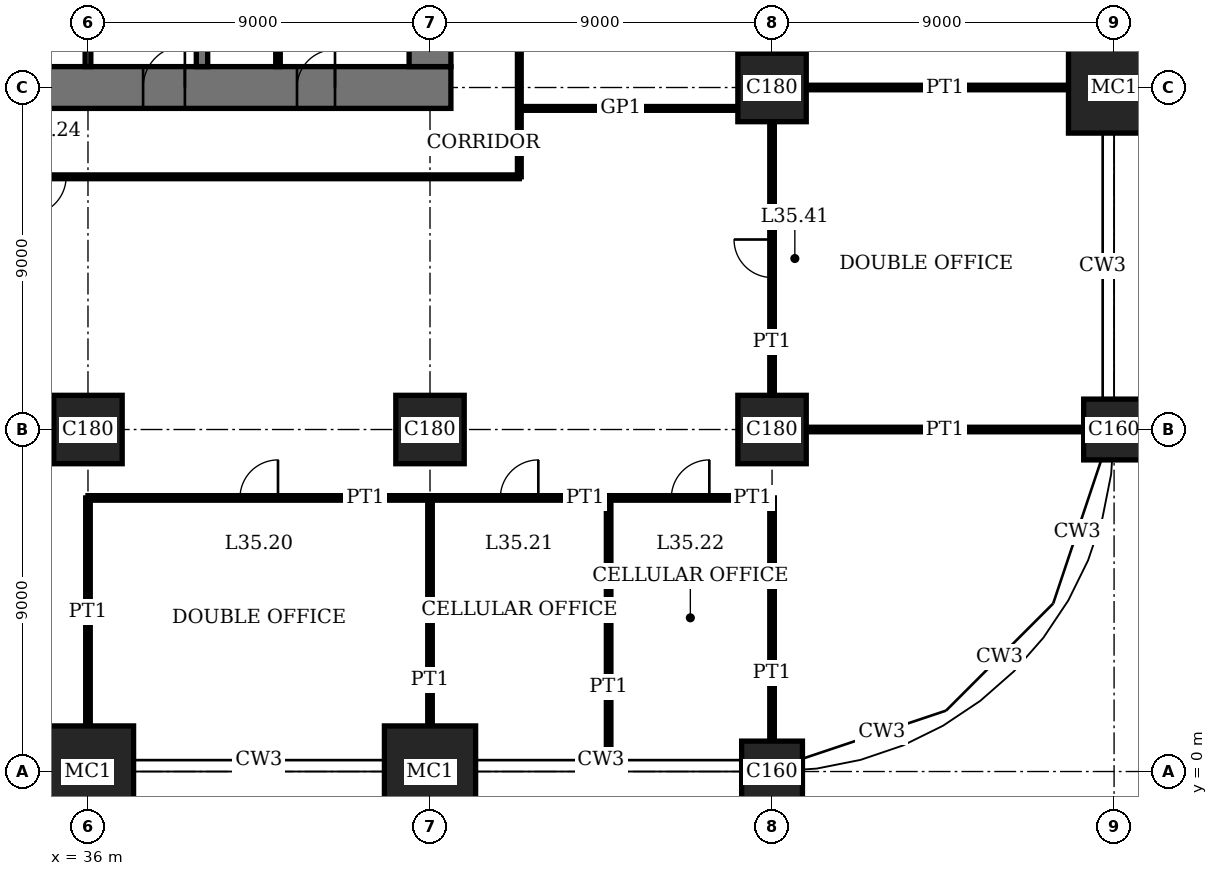
"""IFC4 building model, lengths in metres.
Left out: names, types, materials, properties, quantities, classifications, styles, units other than length and angle.
Written with IfcOpenShell. Run it as: python <this file> out.ifc"""

import sys

from ifc_helpers import new_model, si_unit, direction, frame, frame_2d, origin, origin_2d, place, context, subcontext, project, spatial, rectangle, extrude, element, fill, save


model = new_model("IFC4")
c1 = context("Model", 3, precision=1e-05, world=origin(), true_north=direction((0.0, 1.0)))
c2 = subcontext(c1, "Body", "Model", "MODEL_VIEW")
j1 = project(units=[si_unit("LENGTHUNIT", "METRE"), si_unit("PLANEANGLEUNIT", "RADIAN")], contexts=[c1])
p1 = place(None, origin())
s1 = spatial("IfcSite", under=j1, at=p1, CompositionType="ELEMENT")
p2 = place(p1, origin())
s2 = spatial("IfcBuilding", under=s1, at=p2, CompositionType="ELEMENT")
p3 = place(p2, frame((0.0, 0.0, 145.0)))
s3 = spatial("IfcBuildingStorey", under=s2, at=p3, CompositionType="ELEMENT", Elevation=145.0)
p4 = place(p3, frame((36.0, 0.0, 0.0), z_axis=(0.0, 0.0, 1.0), x_axis=(1.0, 0.0, 0.0)))
e1 = element("IfcColumn", 1, at=p4, inside=s3, PredefinedType="COLUMN", context=c2, shape_type="SweptSolid", body=[
    extrude(rectangle(XDim=2.4, YDim=2.4, at=origin_2d()), origin(), (0.0, 0.0, 1.0), 4.0),
])
p5 = place(p3, frame((36.0, 9.0, 0.0), z_axis=(0.0, 0.0, 1.0), x_axis=(1.0, 0.0, 0.0)))
e2 = element("IfcColumn", 2, at=p5, inside=s3, PredefinedType="COLUMN", context=c2, shape_type="SweptSolid", body=[
    extrude(rectangle(XDim=1.8, YDim=1.8, at=origin_2d()), origin(), (0.0, 0.0, 1.0), 4.0),
])
p6 = place(p3, frame((45.0, 0.0, 0.0), z_axis=(0.0, 0.0, 1.0), x_axis=(1.0, 0.0, 0.0)))
e3 = element("IfcColumn", 3, at=p6, inside=s3, PredefinedType="COLUMN", context=c2, shape_type="SweptSolid", body=[
    extrude(rectangle(XDim=2.4, YDim=2.4, at=origin_2d()), origin(), (0.0, 0.0, 1.0), 4.0),
])
p7 = place(p3, frame((45.0, 9.0, 0.0), z_axis=(0.0, 0.0, 1.0), x_axis=(1.0, 0.0, 0.0)))
e4 = element("IfcColumn", 4, at=p7, inside=s3, PredefinedType="COLUMN", context=c2, shape_type="SweptSolid", body=[
    extrude(rectangle(XDim=1.8, YDim=1.8, at=origin_2d()), origin(), (0.0, 0.0, 1.0), 4.0),
])
p8 = place(p3, frame((54.0, 0.0, 0.0), z_axis=(0.0, 0.0, 1.0), x_axis=(1.0, 0.0, 0.0)))
e5 = element("IfcColumn", 5, at=p8, inside=s3, PredefinedType="COLUMN", context=c2, shape_type="SweptSolid", body=[
    extrude(rectangle(XDim=1.6, YDim=1.6, at=origin_2d()), origin(), (0.0, 0.0, 1.0), 4.0),
])
for number, where, z_axis, x_axis in (
    (6, (54.0, 9.0, 0.0), (0.0, 0.0, 1.0), (1.0, 0.0, 0.0)),
    (7, (54.0, 18.0, 0.0), (0.0, 0.0, 1.0), (1.0, 0.0, 0.0)),
):
    element("IfcColumn", number, at=place(p3, frame(where, z_axis=z_axis, x_axis=x_axis)), inside=s3, PredefinedType="COLUMN", context=c2, shape_type="SweptSolid", body=[
        extrude(rectangle(XDim=1.8, YDim=1.8, at=origin_2d()), origin(), (0.0, 0.0, 1.0), 4.0),
    ])
p9 = place(p3, frame((63.0, 9.0, 0.0), z_axis=(0.0, 0.0, 1.0), x_axis=(1.0, 0.0, 0.0)))
e8 = element("IfcColumn", 8, at=p9, inside=s3, PredefinedType="COLUMN", context=c2, shape_type="SweptSolid", body=[
    extrude(rectangle(XDim=1.6, YDim=1.6, at=origin_2d()), origin(), (0.0, 0.0, 1.0), 4.0),
])
p10 = place(p3, frame((63.0, 18.0, 0.0), z_axis=(0.0, 0.0, 1.0), x_axis=(1.0, 0.0, 0.0)))
e9 = element("IfcColumn", 9, at=p10, inside=s3, PredefinedType="COLUMN", context=c2, shape_type="SweptSolid", body=[
    extrude(rectangle(XDim=2.4, YDim=2.4, at=origin_2d()), origin(), (0.0, 0.0, 1.0), 4.0),
])
p11 = place(p3, frame((17.45, 18.0, 0.0), z_axis=(0.0, 0.0, 1.0), x_axis=(1.0, 0.0, 0.0)))
e10 = element("IfcWall", 10, at=p11, inside=s3, PredefinedType="SHEAR", context=c2, shape_type="SweptSolid", body=[
    extrude(rectangle(XDim=28.1, YDim=1.1, at=frame_2d((14.05, 0.0))), origin(), (0.0, 0.0, 1.0), 4.0),
])
p12 = place(p11, frame((11.55, 0.0, 0.0)))
e11 = element("IfcOpeningElement", 11, at=p12, cuts=e10, PredefinedType="OPENING", context=c2, shape_type="SweptSolid", body=[
    extrude(rectangle(XDim=1.0, YDim=2.4, at=frame_2d((0.5, 1.2))), frame((0.0, 0.56, 0.0), z_axis=(0.0, -1.0, 0.0), x_axis=(1.0, 0.0, 0.0)), (0.0, 0.0, 1.0), 1.12),
])
p13 = place(p11, frame((16.55, 0.0, 0.0)))
e12 = element("IfcOpeningElement", 12, at=p13, cuts=e10, PredefinedType="OPENING", context=c2, shape_type="SweptSolid", body=[
    extrude(rectangle(XDim=1.0, YDim=2.4, at=frame_2d((0.5, 1.2))), frame((0.0, 0.56, 0.0), z_axis=(0.0, -1.0, 0.0), x_axis=(1.0, 0.0, 0.0)), (0.0, 0.0, 1.0), 1.12),
])
p14 = place(p11, frame((20.0, 0.0, 0.0)))
e13 = element("IfcOpeningElement", 13, at=p14, cuts=e10, PredefinedType="OPENING", context=c2, shape_type="SweptSolid", body=[
    extrude(rectangle(XDim=1.1, YDim=2.4, at=frame_2d((0.55, 1.2))), frame((0.0, 0.56, 0.0), z_axis=(0.0, -1.0, 0.0), x_axis=(1.0, 0.0, 0.0)), (0.0, 0.0, 1.0), 1.12),
])
p15 = place(p11, frame((24.05, 0.0, 0.0)))
e14 = element("IfcOpeningElement", 14, at=p15, cuts=e10, PredefinedType="OPENING", context=c2, shape_type="SweptSolid", body=[
    extrude(rectangle(XDim=1.0, YDim=2.4, at=frame_2d((0.5, 1.2))), frame((0.0, 0.56, 0.0), z_axis=(0.0, -1.0, 0.0), x_axis=(1.0, 0.0, 0.0)), (0.0, 0.0, 1.0), 1.12),
])
p16 = place(p3, frame((45.0, 18.55, 0.0), z_axis=(0.0, 0.0, 1.0), x_axis=(0.0, 1.0, 0.0)))
e15 = element("IfcWall", 15, at=p16, inside=s3, PredefinedType="SHEAR", context=c2, shape_type="SweptSolid", body=[
    extrude(rectangle(XDim=16.9, YDim=1.1, at=frame_2d((8.45, 0.0))), origin(), (0.0, 0.0, 1.0), 4.0),
])
p17 = place(p16, frame((8.45, 0.0, 0.0)))
e16 = element("IfcOpeningElement", 16, at=p17, cuts=e15, PredefinedType="OPENING", context=c2, shape_type="SweptSolid", body=[
    extrude(rectangle(XDim=1.8, YDim=2.4, at=frame_2d((0.9, 1.2))), frame((0.0, 0.56, 0.0), z_axis=(0.0, -1.0, 0.0), x_axis=(1.0, 0.0, 0.0)), (0.0, 0.0, 1.0), 1.12),
])
p18 = place(p3, frame((39.0, 18.55, 0.0), z_axis=(0.0, 0.0, 1.0), x_axis=(0.0, 1.0, 0.0)))
e17 = element("IfcWall", 17, at=p18, inside=s3, PredefinedType="SHEAR", context=c2, shape_type="SweptSolid", body=[
    extrude(rectangle(XDim=5.9, YDim=0.3, at=frame_2d((2.95, 0.0))), origin(), (0.0, 0.0, 1.0), 4.0),
])
p19 = place(p3, frame((36.0, 7.2, 0.0), z_axis=(0.0, 0.0, 1.0), x_axis=(1.0, 0.0, 0.0)))
e18 = element("IfcWall", 18, at=p19, inside=s3, PredefinedType="PARTITIONING", context=c2, shape_type="SweptSolid", body=[
    extrude(rectangle(XDim=9.0, YDim=0.12, at=frame_2d((4.5, 0.0))), origin(), (0.0, 0.0, 1.0), 3.75),
])
p20 = place(p19, frame((4.0, 0.0, 0.0)))
e19 = element("IfcOpeningElement", 19, at=p20, cuts=e18, PredefinedType="OPENING", context=c2, shape_type="SweptSolid", body=[
    extrude(rectangle(XDim=1.0, YDim=2.4, at=frame_2d((0.5, 1.2))), frame((0.0, 0.07, 0.0), z_axis=(0.0, -1.0, 0.0), x_axis=(1.0, 0.0, 0.0)), (0.0, 0.0, 1.0), 0.14),
])
p21 = place(p3, frame((45.0, 7.2, 0.0), z_axis=(0.0, 0.0, 1.0), x_axis=(1.0, 0.0, 0.0)))
e20 = element("IfcWall", 20, at=p21, inside=s3, PredefinedType="PARTITIONING", context=c2, shape_type="SweptSolid", body=[
    extrude(rectangle(XDim=4.7, YDim=0.12, at=frame_2d((2.35, 0.0))), origin(), (0.0, 0.0, 1.0), 3.75),
])
p22 = place(p21, frame((1.85, 0.0, 0.0)))
e21 = element("IfcOpeningElement", 21, at=p22, cuts=e20, PredefinedType="OPENING", context=c2, shape_type="SweptSolid", body=[
    extrude(rectangle(XDim=1.0, YDim=2.4, at=frame_2d((0.5, 1.2))), frame((0.0, 0.07, 0.0), z_axis=(0.0, -1.0, 0.0), x_axis=(1.0, 0.0, 0.0)), (0.0, 0.0, 1.0), 0.14),
])
p23 = place(p3, frame((49.7, 7.2, 0.0), z_axis=(0.0, 0.0, 1.0), x_axis=(1.0, 0.0, 0.0)))
e22 = element("IfcWall", 22, at=p23, inside=s3, PredefinedType="PARTITIONING", context=c2, shape_type="SweptSolid", body=[
    extrude(rectangle(XDim=4.3, YDim=0.12, at=frame_2d((2.15, 0.0))), origin(), (0.0, 0.0, 1.0), 3.75),
])
p24 = place(p23, frame((1.65, 0.0, 0.0)))
e23 = element("IfcOpeningElement", 23, at=p24, cuts=e22, PredefinedType="OPENING", context=c2, shape_type="SweptSolid", body=[
    extrude(rectangle(XDim=1.0, YDim=2.4, at=frame_2d((0.5, 1.2))), frame((0.0, 0.07, 0.0), z_axis=(0.0, -1.0, 0.0), x_axis=(1.0, 0.0, 0.0)), (0.0, 0.0, 1.0), 0.14),
])
p25 = place(p3, frame((54.9, 9.0, 0.0), z_axis=(0.0, 0.0, 1.0), x_axis=(1.0, 0.0, 0.0)))
e24 = element("IfcWall", 24, at=p25, inside=s3, PredefinedType="PARTITIONING", context=c2, shape_type="SweptSolid", body=[
    extrude(rectangle(XDim=7.3, YDim=0.12, at=frame_2d((3.65, 0.0))), origin(), (0.0, 0.0, 1.0), 3.05),
])
p26 = place(p3, frame((22.5, 15.65, 0.0), z_axis=(0.0, 0.0, 1.0), x_axis=(1.0, 0.0, 0.0)))
e25 = element("IfcWall", 25, at=p26, inside=s3, PredefinedType="PARTITIONING", context=c2, shape_type="SweptSolid", body=[
    extrude(rectangle(XDim=24.85, YDim=0.1, at=frame_2d((12.425, 0.0))), origin(), (0.0, 0.0, 1.0), 3.75),
])
p27 = place(p26, frame((11.925, 0.0, 0.0)))
e26 = element("IfcOpeningElement", 26, at=p27, cuts=e25, PredefinedType="OPENING", context=c2, shape_type="SweptSolid", body=[
    extrude(rectangle(XDim=1.0, YDim=2.4, at=frame_2d((0.5, 1.2))), frame((0.0, 0.06, 0.0), z_axis=(0.0, -1.0, 0.0), x_axis=(1.0, 0.0, 0.0)), (0.0, 0.0, 1.0), 0.12),
])
p28 = place(p3, frame((47.35, 17.45, 0.0), z_axis=(0.0, 0.0, 1.0), x_axis=(1.0, 0.0, 0.0)))
e27 = element("IfcWall", 27, at=p28, inside=s3, PredefinedType="PARTITIONING", context=c2, shape_type="SweptSolid", body=[
    extrude(rectangle(XDim=5.75, YDim=0.1, at=frame_2d((2.875, 0.0))), origin(), (0.0, 0.0, 1.0), 3.05),
])
p29 = place(p3, frame((54.9, 18.0, 0.0), z_axis=(0.0, 0.0, 1.0), x_axis=(1.0, 0.0, 0.0)))
e28 = element("IfcWall", 28, at=p29, inside=s3, PredefinedType="PARTITIONING", context=c2, shape_type="SweptSolid", body=[
    extrude(rectangle(XDim=6.9, YDim=0.12, at=frame_2d((3.45, 0.0))), origin(), (0.0, 0.0, 1.0), 3.05),
])
for number, where, z_axis, x_axis in (
    (29, (36.0, 1.2, 0.0), (0.0, 0.0, 1.0), (0.0, 1.0, 0.0)),
    (30, (45.0, 1.2, 0.0), (0.0, 0.0, 1.0), (0.0, 1.0, 0.0)),
):
    element("IfcWall", number, at=place(p3, frame(where, z_axis=z_axis, x_axis=x_axis)), inside=s3, PredefinedType="PARTITIONING", context=c2, shape_type="SweptSolid", body=[
        extrude(rectangle(XDim=6.0, YDim=0.12, at=frame_2d((3.0, 0.0))), origin(), (0.0, 0.0, 1.0), 3.05),
    ])
p30 = place(p3, frame((47.35, 15.65, 0.0), z_axis=(0.0, 0.0, 1.0), x_axis=(0.0, 1.0, 0.0)))
e31 = element("IfcWall", 31, at=p30, inside=s3, PredefinedType="PARTITIONING", context=c2, shape_type="SweptSolid", body=[
    extrude(rectangle(XDim=20.9, YDim=0.1, at=frame_2d((10.45, 0.0))), origin(), (0.0, 0.0, 1.0), 3.75),
])
p31 = place(p30, frame((9.95, 0.0, 0.0)))
e32 = element("IfcOpeningElement", 32, at=p31, cuts=e31, PredefinedType="OPENING", context=c2, shape_type="SweptSolid", body=[
    extrude(rectangle(XDim=1.0, YDim=2.4, at=frame_2d((0.5, 1.2))), frame((0.0, 0.06, 0.0), z_axis=(0.0, -1.0, 0.0), x_axis=(1.0, 0.0, 0.0)), (0.0, 0.0, 1.0), 0.12),
])
p32 = place(p3, frame((49.7, 0.31, 0.0), z_axis=(0.0, 0.0, 1.0), x_axis=(0.0, 1.0, 0.0)))
e33 = element("IfcWall", 33, at=p32, inside=s3, PredefinedType="PARTITIONING", context=c2, shape_type="SweptSolid", body=[
    extrude(rectangle(XDim=6.89, YDim=0.12, at=frame_2d((3.445, 0.0))), origin(), (0.0, 0.0, 1.0), 3.75),
])
p33 = place(p3, frame((54.0, 0.8, 0.0), z_axis=(0.0, 0.0, 1.0), x_axis=(0.0, 1.0, 0.0)))
e34 = element("IfcWall", 34, at=p33, inside=s3, PredefinedType="PARTITIONING", context=c2, shape_type="SweptSolid", body=[
    extrude(rectangle(XDim=6.4, YDim=0.12, at=frame_2d((3.2, 0.0))), origin(), (0.0, 0.0, 1.0), 3.05),
])
p34 = place(p3, frame((54.0, 9.9, 0.0), z_axis=(0.0, 0.0, 1.0), x_axis=(0.0, 1.0, 0.0)))
e35 = element("IfcWall", 35, at=p34, inside=s3, PredefinedType="PARTITIONING", context=c2, shape_type="SweptSolid", body=[
    extrude(rectangle(XDim=7.2, YDim=0.12, at=frame_2d((3.6, 0.0))), origin(), (0.0, 0.0, 1.0), 3.05),
])
p35 = place(p34, frame((3.1, 0.0, 0.0)))
e36 = element("IfcOpeningElement", 36, at=p35, cuts=e35, PredefinedType="OPENING", context=c2, shape_type="SweptSolid", body=[
    extrude(rectangle(XDim=1.0, YDim=2.4, at=frame_2d((0.5, 1.2))), frame((0.0, 0.07, 0.0), z_axis=(0.0, -1.0, 0.0), x_axis=(1.0, 0.0, 0.0)), (0.0, 0.0, 1.0), 0.14),
])
p36 = place(p3, frame((36.0, 18.55, 0.0), z_axis=(0.0, 0.0, 1.0), x_axis=(0.0, 1.0, 0.0)))
e37 = element("IfcWall", 37, at=p36, inside=s3, PredefinedType="PARTITIONING", context=c2, shape_type="SweptSolid", body=[
    extrude(rectangle(XDim=2.9, YDim=0.15, at=frame_2d((1.45, 0.0))), origin(), (0.0, 0.0, 1.0), 3.75),
])
p37 = place(p3, frame((41.0, 18.55, 0.0), z_axis=(0.0, 0.0, 1.0), x_axis=(0.0, 1.0, 0.0)))
e38 = element("IfcWall", 38, at=p37, inside=s3, PredefinedType="PARTITIONING", context=c2, shape_type="SweptSolid", body=[
    extrude(rectangle(XDim=2.9, YDim=0.12, at=frame_2d((1.45, 0.0))), origin(), (0.0, 0.0, 1.0), 3.75),
])
p38 = place(p37, frame((0.95, 0.0, 0.0)))
e39 = element("IfcOpeningElement", 39, at=p38, cuts=e38, PredefinedType="OPENING", context=c2, shape_type="SweptSolid", body=[
    extrude(rectangle(XDim=1.0, YDim=2.4, at=frame_2d((0.5, 1.2))), frame((0.0, 0.07, 0.0), z_axis=(0.0, -1.0, 0.0), x_axis=(1.0, 0.0, 0.0)), (0.0, 0.0, 1.0), 0.14),
])
p39 = place(p14, origin())
e40 = element("IfcDoor", 40, at=p39, inside=s3, OperationType="SINGLE_SWING_LEFT", PredefinedType="DOOR", context=c2, shape_type="SweptSolid", body=[
    extrude(rectangle(XDim=1.1, YDim=2.4, at=frame_2d((0.55, 1.2))), frame((0.0, 0.025, 0.0), z_axis=(0.0, -1.0, 0.0), x_axis=(1.0, 0.0, 0.0)), (0.0, 0.0, 1.0), 0.05),
    extrude(rectangle(XDim=0.04, YDim=2.4, at=frame_2d((0.02, 1.2))), frame((0.0, 0.44, 0.0), z_axis=(0.0, -1.0, 0.0), x_axis=(1.0, 0.0, 0.0)), (0.0, 0.0, 1.0), 0.88),
    extrude(rectangle(XDim=0.04, YDim=2.4, at=frame_2d((1.08, 1.2))), frame((0.0, 0.44, 0.0), z_axis=(0.0, -1.0, 0.0), x_axis=(1.0, 0.0, 0.0)), (0.0, 0.0, 1.0), 0.88),
    extrude(rectangle(XDim=1.1, YDim=0.04, at=frame_2d((0.55, 2.38))), frame((0.0, 0.44, 0.0), z_axis=(0.0, -1.0, 0.0), x_axis=(1.0, 0.0, 0.0)), (0.0, 0.0, 1.0), 0.88),
])
fill(e13, e40)
p40 = place(p15, origin())
e41 = element("IfcDoor", 41, at=p40, inside=s3, OperationType="SINGLE_SWING_LEFT", PredefinedType="DOOR", context=c2, shape_type="SweptSolid", body=[
    extrude(rectangle(XDim=1.0, YDim=2.4, at=frame_2d((0.5, 1.2))), frame((0.0, 0.025, 0.0), z_axis=(0.0, -1.0, 0.0), x_axis=(1.0, 0.0, 0.0)), (0.0, 0.0, 1.0), 0.05),
    extrude(rectangle(XDim=0.04, YDim=2.4, at=frame_2d((0.02, 1.2))), frame((0.0, 0.4, 0.0), z_axis=(0.0, -1.0, 0.0), x_axis=(1.0, 0.0, 0.0)), (0.0, 0.0, 1.0), 0.8),
    extrude(rectangle(XDim=0.04, YDim=2.4, at=frame_2d((0.98, 1.2))), frame((0.0, 0.4, 0.0), z_axis=(0.0, -1.0, 0.0), x_axis=(1.0, 0.0, 0.0)), (0.0, 0.0, 1.0), 0.8),
    extrude(rectangle(XDim=1.0, YDim=0.04, at=frame_2d((0.5, 2.38))), frame((0.0, 0.4, 0.0), z_axis=(0.0, -1.0, 0.0), x_axis=(1.0, 0.0, 0.0)), (0.0, 0.0, 1.0), 0.8),
])
fill(e14, e41)
p41 = place(p20, origin())
e42 = element("IfcDoor", 42, at=p41, inside=s3, OperationType="SINGLE_SWING_LEFT", PredefinedType="DOOR", context=c2, shape_type="SweptSolid", body=[
    extrude(rectangle(XDim=1.0, YDim=2.4, at=frame_2d((0.5, 1.2))), frame((0.0, 0.025, 0.0), z_axis=(0.0, -1.0, 0.0), x_axis=(1.0, 0.0, 0.0)), (0.0, 0.0, 1.0), 0.05),
])
fill(e19, e42)
p42 = place(p22, origin())
e43 = element("IfcDoor", 43, at=p42, inside=s3, OperationType="SINGLE_SWING_LEFT", PredefinedType="DOOR", context=c2, shape_type="SweptSolid", body=[
    extrude(rectangle(XDim=1.0, YDim=2.4, at=frame_2d((0.5, 1.2))), frame((0.0, 0.025, 0.0), z_axis=(0.0, -1.0, 0.0), x_axis=(1.0, 0.0, 0.0)), (0.0, 0.0, 1.0), 0.05),
])
fill(e21, e43)
p43 = place(p24, origin())
e44 = element("IfcDoor", 44, at=p43, inside=s3, OperationType="SINGLE_SWING_LEFT", PredefinedType="DOOR", context=c2, shape_type="SweptSolid", body=[
    extrude(rectangle(XDim=1.0, YDim=2.4, at=frame_2d((0.5, 1.2))), frame((0.0, 0.025, 0.0), z_axis=(0.0, -1.0, 0.0), x_axis=(1.0, 0.0, 0.0)), (0.0, 0.0, 1.0), 0.05),
])
fill(e23, e44)
p44 = place(p27, origin())
e45 = element("IfcDoor", 45, at=p44, inside=s3, OperationType="SINGLE_SWING_LEFT", PredefinedType="DOOR", context=c2, shape_type="SweptSolid", body=[
    extrude(rectangle(XDim=1.0, YDim=2.4, at=frame_2d((0.5, 1.2))), frame((0.0, 0.02, 0.0), z_axis=(0.0, -1.0, 0.0), x_axis=(1.0, 0.0, 0.0)), (0.0, 0.0, 1.0), 0.04),
])
fill(e26, e45)
p45 = place(p35, origin())
e46 = element("IfcDoor", 46, at=p45, inside=s3, OperationType="SINGLE_SWING_LEFT", PredefinedType="DOOR", context=c2, shape_type="SweptSolid", body=[
    extrude(rectangle(XDim=1.0, YDim=2.4, at=frame_2d((0.5, 1.2))), frame((0.0, 0.025, 0.0), z_axis=(0.0, -1.0, 0.0), x_axis=(1.0, 0.0, 0.0)), (0.0, 0.0, 1.0), 0.05),
])
fill(e36, e46)
save(model, sys.argv[1])
